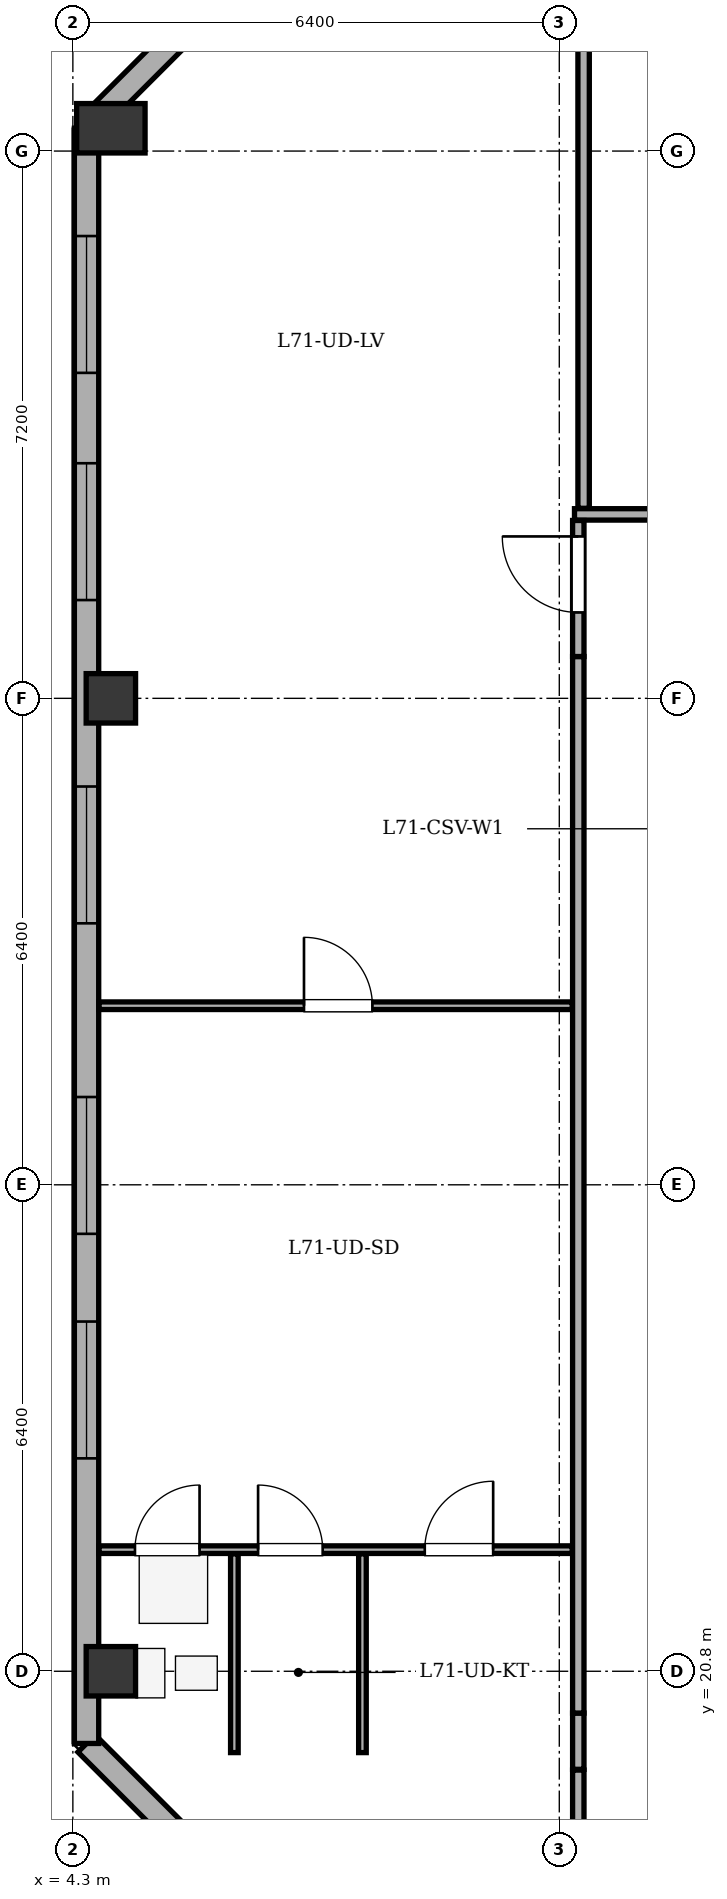
"""IFC4 building model, lengths in metres.
Left out: names, types, materials, properties, quantities, classifications, styles, units other than length and angle.
Written with IfcOpenShell. Run it as: python <this file> out.ifc"""

import sys

from ifc_helpers import new_model, si_unit, direction, frame, frame_2d, origin, origin_2d, place, context, subcontext, project, spatial, rectangle, extrude, element, fill, save


model = new_model("IFC4")
c1 = context("Model", 3, precision=1e-05, world=origin(), true_north=direction((0.0, 1.0)))
c2 = subcontext(c1, "Body", "Model", "MODEL_VIEW")
j1 = project(units=[si_unit("LENGTHUNIT", "METRE"), si_unit("PLANEANGLEUNIT", "RADIAN")], contexts=[c1])
p1 = place(None, origin())
s1 = spatial("IfcSite", under=j1, at=p1, CompositionType="ELEMENT")
p2 = place(p1, origin())
s2 = spatial("IfcBuilding", under=s1, at=p2, CompositionType="ELEMENT")
p3 = place(p2, frame((0.0, 0.0, 268.7)))
s3 = spatial("IfcBuildingStorey", under=s2, at=p3, CompositionType="ELEMENT", Elevation=268.7)
for number, where, z_axis, x_axis in (
    (1, (4.8, 20.8, 0.0), (0.0, 0.0, 1.0), (1.0, 0.0, 0.0)),
    (2, (4.8, 33.6, 0.0), (0.0, 0.0, 1.0), (1.0, 0.0, 0.0)),
):
    element("IfcColumn", number, at=place(p3, frame(where, z_axis=z_axis, x_axis=x_axis)), inside=s3, PredefinedType="COLUMN", context=c2, shape_type="SweptSolid", body=[
        extrude(rectangle(XDim=0.65, YDim=0.65, at=origin_2d()), origin(), (0.0, 0.0, 1.0), 3.4),
    ])
p4 = place(p3, frame((4.8, 41.1, 0.0), z_axis=(0.0, 0.0, 1.0), x_axis=(1.0, 0.0, 0.0)))
e3 = element("IfcColumn", 3, at=p4, inside=s3, PredefinedType="COLUMN", context=c2, shape_type="SweptSolid", body=[
    extrude(rectangle(XDim=0.65, YDim=0.9, at=origin_2d()), origin(), (0.0, 0.0, 1.0), 3.4),
])
p5 = place(p3, frame((8.3, 16.03, 0.0), z_axis=(0.0, 0.0, 1.0), x_axis=(-0.707106781187, 0.707106781187, 0.0)))
e4 = element("IfcWall", 4, at=p5, inside=s3, PredefinedType="STANDARD", context=c2, shape_type="SweptSolid", body=[
    extrude(rectangle(XDim=5.402, YDim=0.32, at=frame_2d((2.701, 0.0))), origin(), (0.0, 0.0, 1.0), 2.725),
])
p6 = place(p5, frame((2.001, 0.0, 0.75)))
e5 = element("IfcOpeningElement", 5, at=p6, cuts=e4, PredefinedType="OPENING", context=c2, shape_type="SweptSolid", body=[
    extrude(rectangle(XDim=1.4, YDim=1.65, at=frame_2d((0.7, 0.825))), frame((0.0, 0.17, 0.0), z_axis=(0.0, -1.0, 0.0), x_axis=(1.0, 0.0, 0.0)), (0.0, 0.0, 1.0), 0.34),
])
p7 = place(p3, frame((4.48, 19.85, 0.0), z_axis=(0.0, 0.0, 1.0), x_axis=(0.0, 1.0, 0.0)))
e6 = element("IfcWall", 6, at=p7, inside=s3, PredefinedType="STANDARD", context=c2, shape_type="SweptSolid", body=[
    extrude(rectangle(XDim=21.25, YDim=0.32, at=frame_2d((10.625, 0.0))), origin(), (0.0, 0.0, 1.0), 2.725),
])
p8 = place(p7, frame((3.751, 0.0, 0.75)))
e7 = element("IfcOpeningElement", 7, at=p8, cuts=e6, PredefinedType="OPENING", context=c2, shape_type="SweptSolid", body=[
    extrude(rectangle(XDim=1.8, YDim=1.7, at=frame_2d((0.9, 0.85))), frame((0.0, 0.17, 0.0), z_axis=(0.0, -1.0, 0.0), x_axis=(1.0, 0.0, 0.0)), (0.0, 0.0, 1.0), 0.34),
])
p9 = place(p7, frame((6.705, 0.0, 0.75)))
e8 = element("IfcOpeningElement", 8, at=p9, cuts=e6, PredefinedType="OPENING", context=c2, shape_type="SweptSolid", body=[
    extrude(rectangle(XDim=1.8, YDim=1.7, at=frame_2d((0.9, 0.85))), frame((0.0, 0.17, 0.0), z_axis=(0.0, -1.0, 0.0), x_axis=(1.0, 0.0, 0.0)), (0.0, 0.0, 1.0), 0.34),
])
p10 = place(p7, frame((10.79, 0.0, 0.75)))
e9 = element("IfcOpeningElement", 9, at=p10, cuts=e6, PredefinedType="OPENING", context=c2, shape_type="SweptSolid", body=[
    extrude(rectangle(XDim=1.8, YDim=1.7, at=frame_2d((0.9, 0.85))), frame((0.0, 0.17, 0.0), z_axis=(0.0, -1.0, 0.0), x_axis=(1.0, 0.0, 0.0)), (0.0, 0.0, 1.0), 0.34),
])
p11 = place(p7, frame((15.043, 0.0, 0.75)))
e10 = element("IfcOpeningElement", 10, at=p11, cuts=e6, PredefinedType="OPENING", context=c2, shape_type="SweptSolid", body=[
    extrude(rectangle(XDim=1.8, YDim=1.7, at=frame_2d((0.9, 0.85))), frame((0.0, 0.17, 0.0), z_axis=(0.0, -1.0, 0.0), x_axis=(1.0, 0.0, 0.0)), (0.0, 0.0, 1.0), 0.34),
])
p12 = place(p7, frame((18.032, 0.0, 0.75)))
e11 = element("IfcOpeningElement", 11, at=p12, cuts=e6, PredefinedType="OPENING", context=c2, shape_type="SweptSolid", body=[
    extrude(rectangle(XDim=1.8, YDim=1.7, at=frame_2d((0.9, 0.85))), frame((0.0, 0.17, 0.0), z_axis=(0.0, -1.0, 0.0), x_axis=(1.0, 0.0, 0.0)), (0.0, 0.0, 1.0), 0.34),
])
p13 = place(p3, frame((4.48, 41.1, 0.0), z_axis=(0.0, 0.0, 1.0), x_axis=(0.70712937715, 0.707084184501, 0.0)))
e12 = element("IfcWall", 12, at=p13, inside=s3, PredefinedType="STANDARD", context=c2, shape_type="SweptSolid", body=[
    extrude(rectangle(XDim=5.402, YDim=0.32, at=frame_2d((2.701, 0.0))), origin(), (0.0, 0.0, 1.0), 2.725),
])
p14 = place(p13, frame((2.001, 0.0, 0.75)))
e13 = element("IfcOpeningElement", 13, at=p14, cuts=e12, PredefinedType="OPENING", context=c2, shape_type="SweptSolid", body=[
    extrude(rectangle(XDim=1.4, YDim=1.65, at=frame_2d((0.7, 0.825))), frame((0.0, 0.17, 0.0), z_axis=(0.0, -1.0, 0.0), x_axis=(1.0, 0.0, 0.0)), (0.0, 0.0, 1.0), 0.34),
])
p15 = place(p3, frame((10.9, 36.02, 0.0), z_axis=(0.0, 0.0, 1.0), x_axis=(1.0, 0.0, 0.0)))
e14 = element("IfcWall", 14, at=p15, inside=s3, PredefinedType="PARTITIONING", context=c2, shape_type="SweptSolid", body=[
    extrude(rectangle(XDim=34.52, YDim=0.15, at=frame_2d((17.26, 0.0))), origin(), (0.0, 0.0, 1.0), 3.1),
])
p16 = place(p15, frame((5.276, 0.0, 0.0)))
e15 = element("IfcOpeningElement", 15, at=p16, cuts=e14, PredefinedType="OPENING", context=c2, shape_type="SweptSolid", body=[
    extrude(rectangle(XDim=1.0, YDim=2.1, at=frame_2d((0.5, 1.05))), frame((0.0, 0.085, 0.0), z_axis=(0.0, -1.0, 0.0), x_axis=(1.0, 0.0, 0.0)), (0.0, 0.0, 1.0), 0.17),
])
p17 = place(p15, frame((16.931, 0.0, 0.0)))
e16 = element("IfcOpeningElement", 16, at=p17, cuts=e14, PredefinedType="OPENING", context=c2, shape_type="SweptSolid", body=[
    extrude(rectangle(XDim=1.0, YDim=2.1, at=frame_2d((0.5, 1.05))), frame((0.0, 0.085, 0.0), z_axis=(0.0, -1.0, 0.0), x_axis=(1.0, 0.0, 0.0)), (0.0, 0.0, 1.0), 0.17),
])
p18 = place(p15, frame((28.415, 0.0, 0.0)))
e17 = element("IfcOpeningElement", 17, at=p18, cuts=e14, PredefinedType="OPENING", context=c2, shape_type="SweptSolid", body=[
    extrude(rectangle(XDim=1.0, YDim=2.1, at=frame_2d((0.5, 1.05))), frame((0.0, 0.085, 0.0), z_axis=(0.0, -1.0, 0.0), x_axis=(1.0, 0.0, 0.0)), (0.0, 0.0, 1.0), 0.17),
])
p19 = place(p3, frame((11.02, 36.1, 0.0), z_axis=(0.0, 0.0, 1.0), x_axis=(0.0, 1.0, 0.0)))
e18 = element("IfcWall", 18, at=p19, inside=s3, PredefinedType="PARTITIONING", context=c2, shape_type="SweptSolid", body=[
    extrude(rectangle(XDim=8.655, YDim=0.15, at=frame_2d((4.327, 0.0))), origin(), (0.0, 0.0, 1.0), 3.1),
])
p20 = place(p3, frame((10.95, 19.5, 0.0), z_axis=(0.0, 0.0, 1.0), x_axis=(0.0, -1.0, 0.0)))
e19 = element("IfcWall", 19, at=p20, inside=s3, PredefinedType="PARTITIONING", context=c2, shape_type="SweptSolid", body=[
    extrude(rectangle(XDim=0.96, YDim=0.15, at=frame_2d((0.48, 0.0))), origin(), (0.0, 0.0, 1.0), 3.1),
])
p21 = place(p3, frame((10.95, 19.51, 0.0), z_axis=(0.0, 0.0, 1.0), x_axis=(0.0, 1.0, 0.0)))
e20 = element("IfcWall", 20, at=p21, inside=s3, PredefinedType="PARTITIONING", context=c2, shape_type="SweptSolid", body=[
    extrude(rectangle(XDim=0.74, YDim=0.15, at=frame_2d((0.37, 0.0))), origin(), (0.0, 0.0, 1.0), 3.1),
])
p22 = place(p3, frame((10.95, 20.25, 0.0), z_axis=(0.0, 0.0, 1.0), x_axis=(0.0, 1.0, 0.0)))
e21 = element("IfcWall", 21, at=p22, inside=s3, PredefinedType="PARTITIONING", context=c2, shape_type="SweptSolid", body=[
    extrude(rectangle(XDim=13.9, YDim=0.15, at=frame_2d((6.95, 0.0))), origin(), (0.0, 0.0, 1.0), 3.1),
])
p23 = place(p3, frame((10.95, 34.15, 0.0), z_axis=(0.0, 0.0, 1.0), x_axis=(0.0, 1.0, 0.0)))
e22 = element("IfcWall", 22, at=p23, inside=s3, PredefinedType="PARTITIONING", context=c2, shape_type="SweptSolid", body=[
    extrude(rectangle(XDim=1.79, YDim=0.15, at=frame_2d((0.895, 0.0))), origin(), (0.0, 0.0, 1.0), 3.1),
])
p24 = place(p23, frame((0.58, 0.0, 0.0)))
e23 = element("IfcOpeningElement", 23, at=p24, cuts=e22, PredefinedType="OPENING", context=c2, shape_type="SweptSolid", body=[
    extrude(rectangle(XDim=1.0, YDim=2.1, at=frame_2d((0.5, 1.05))), frame((0.0, 0.085, 0.0), z_axis=(0.0, -1.0, 0.0), x_axis=(1.0, 0.0, 0.0)), (0.0, 0.0, 1.0), 0.17),
])
p25 = place(p3, frame((4.645, 22.4, 0.0), z_axis=(0.0, 0.0, 1.0), x_axis=(1.0, 0.0, 0.0)))
e24 = element("IfcWall", 24, at=p25, inside=s3, PredefinedType="PARTITIONING", context=c2, shape_type="SweptSolid", body=[
    extrude(rectangle(XDim=6.225, YDim=0.1, at=frame_2d((3.113, 0.0))), origin(), (0.0, 0.0, 1.0), 3.1),
])
p26 = place(p25, frame((0.472, 0.0, 0.0)))
e25 = element("IfcOpeningElement", 25, at=p26, cuts=e24, PredefinedType="OPENING", context=c2, shape_type="SweptSolid", body=[
    extrude(rectangle(XDim=0.85, YDim=2.05, at=frame_2d((0.425, 1.025))), frame((0.0, 0.06, 0.0), z_axis=(0.0, -1.0, 0.0), x_axis=(1.0, 0.0, 0.0)), (0.0, 0.0, 1.0), 0.12),
])
p27 = place(p25, frame((2.092, 0.0, 0.0)))
e26 = element("IfcOpeningElement", 26, at=p27, cuts=e24, PredefinedType="OPENING", context=c2, shape_type="SweptSolid", body=[
    extrude(rectangle(XDim=0.85, YDim=2.05, at=frame_2d((0.425, 1.025))), frame((0.0, 0.06, 0.0), z_axis=(0.0, -1.0, 0.0), x_axis=(1.0, 0.0, 0.0)), (0.0, 0.0, 1.0), 0.12),
])
p28 = place(p25, frame((4.285, 0.0, 0.0)))
e27 = element("IfcOpeningElement", 27, at=p28, cuts=e24, PredefinedType="OPENING", context=c2, shape_type="SweptSolid", body=[
    extrude(rectangle(XDim=0.9, YDim=2.05, at=frame_2d((0.45, 1.025))), frame((0.0, 0.06, 0.0), z_axis=(0.0, -1.0, 0.0), x_axis=(1.0, 0.0, 0.0)), (0.0, 0.0, 1.0), 0.12),
])
p29 = place(p3, frame((4.645, 29.556, 0.0), z_axis=(0.0, 0.0, 1.0), x_axis=(1.0, 0.0, 0.0)))
e28 = element("IfcWall", 28, at=p29, inside=s3, PredefinedType="PARTITIONING", context=c2, shape_type="SweptSolid", body=[
    extrude(rectangle(XDim=6.225, YDim=0.1, at=frame_2d((3.113, 0.0))), origin(), (0.0, 0.0, 1.0), 2.725),
])
p30 = place(p29, frame((2.696, 0.0, 0.0)))
e29 = element("IfcOpeningElement", 29, at=p30, cuts=e28, PredefinedType="OPENING", context=c2, shape_type="SweptSolid", body=[
    extrude(rectangle(XDim=0.9, YDim=2.05, at=frame_2d((0.45, 1.025))), frame((0.0, 0.06, 0.0), z_axis=(0.0, -1.0, 0.0), x_axis=(1.0, 0.0, 0.0)), (0.0, 0.0, 1.0), 0.12),
])
for number, where, z_axis, x_axis in (
    (30, (6.425, 19.73, 0.0), (0.0, 0.0, 1.0), (0.0, 1.0, 0.0)),
    (31, (8.11, 19.73, 0.0), (0.0, 0.0, 1.0), (0.0, 1.0, 0.0)),
):
    element("IfcWall", number, at=place(p3, frame(where, z_axis=z_axis, x_axis=x_axis)), inside=s3, PredefinedType="PARTITIONING", context=c2, shape_type="SweptSolid", body=[
        extrude(rectangle(XDim=2.615, YDim=0.1, at=frame_2d((1.308, 0.0))), origin(), (0.0, 0.0, 1.0), 3.1),
    ])
p31 = place(p8, origin())
e32 = element("IfcWindow", 32, at=p31, inside=s3, PartitioningType="SINGLE_PANEL", PredefinedType="WINDOW", context=c2, shape_type="SweptSolid", body=[
    extrude(rectangle(XDim=1.8, YDim=1.7, at=frame_2d((0.9, 0.85))), frame((0.0, -0.01, 0.0), z_axis=(0.0, -1.0, 0.0), x_axis=(1.0, 0.0, 0.0)), (0.0, 0.0, 1.0), 0.06),
])
fill(e7, e32)
p32 = place(p9, origin())
e33 = element("IfcWindow", 33, at=p32, inside=s3, PartitioningType="SINGLE_PANEL", PredefinedType="WINDOW", context=c2, shape_type="SweptSolid", body=[
    extrude(rectangle(XDim=1.8, YDim=1.7, at=frame_2d((0.9, 0.85))), frame((0.0, -0.01, 0.0), z_axis=(0.0, -1.0, 0.0), x_axis=(1.0, 0.0, 0.0)), (0.0, 0.0, 1.0), 0.06),
])
fill(e8, e33)
p33 = place(p10, origin())
e34 = element("IfcWindow", 34, at=p33, inside=s3, PartitioningType="SINGLE_PANEL", PredefinedType="WINDOW", context=c2, shape_type="SweptSolid", body=[
    extrude(rectangle(XDim=1.8, YDim=1.7, at=frame_2d((0.9, 0.85))), frame((0.0, -0.01, 0.0), z_axis=(0.0, -1.0, 0.0), x_axis=(1.0, 0.0, 0.0)), (0.0, 0.0, 1.0), 0.06),
])
fill(e9, e34)
p34 = place(p11, origin())
e35 = element("IfcWindow", 35, at=p34, inside=s3, PartitioningType="SINGLE_PANEL", PredefinedType="WINDOW", context=c2, shape_type="SweptSolid", body=[
    extrude(rectangle(XDim=1.8, YDim=1.7, at=frame_2d((0.9, 0.85))), frame((0.0, -0.01, 0.0), z_axis=(0.0, -1.0, 0.0), x_axis=(1.0, 0.0, 0.0)), (0.0, 0.0, 1.0), 0.06),
])
fill(e10, e35)
p35 = place(p12, origin())
e36 = element("IfcWindow", 36, at=p35, inside=s3, PartitioningType="SINGLE_PANEL", PredefinedType="WINDOW", context=c2, shape_type="SweptSolid", body=[
    extrude(rectangle(XDim=1.8, YDim=1.7, at=frame_2d((0.9, 0.85))), frame((0.0, -0.01, 0.0), z_axis=(0.0, -1.0, 0.0), x_axis=(1.0, 0.0, 0.0)), (0.0, 0.0, 1.0), 0.06),
])
fill(e11, e36)
p36 = place(p24, origin())
e37 = element("IfcDoor", 37, at=p36, inside=s3, OperationType="SINGLE_SWING_RIGHT", PredefinedType="DOOR", context=c2, shape_type="SweptSolid", body=[
    extrude(rectangle(XDim=1.0, YDim=2.1, at=frame_2d((0.5, 1.05))), frame((0.0, 0.025, 0.0), z_axis=(0.0, -1.0, 0.0), x_axis=(1.0, 0.0, 0.0)), (0.0, 0.0, 1.0), 0.05),
])
fill(e23, e37)
p37 = place(p30, origin())
e38 = element("IfcDoor", 38, at=p37, inside=s3, OperationType="SINGLE_SWING_LEFT", PredefinedType="DOOR", context=c2, shape_type="SweptSolid", body=[
    extrude(rectangle(XDim=0.9, YDim=2.05, at=frame_2d((0.45, 1.025))), frame((0.0, 0.025, 0.0), z_axis=(0.0, -1.0, 0.0), x_axis=(1.0, 0.0, 0.0)), (0.0, 0.0, 1.0), 0.05),
])
fill(e29, e38)
p38 = place(p26, origin())
e39 = element("IfcDoor", 39, at=p38, inside=s3, OperationType="SINGLE_SWING_RIGHT", PredefinedType="DOOR", context=c2, shape_type="SweptSolid", body=[
    extrude(rectangle(XDim=0.85, YDim=2.05, at=frame_2d((0.425, 1.025))), frame((0.0, 0.025, 0.0), z_axis=(0.0, -1.0, 0.0), x_axis=(1.0, 0.0, 0.0)), (0.0, 0.0, 1.0), 0.05),
])
fill(e25, e39)
p39 = place(p27, origin())
e40 = element("IfcDoor", 40, at=p39, inside=s3, OperationType="SINGLE_SWING_LEFT", PredefinedType="DOOR", context=c2, shape_type="SweptSolid", body=[
    extrude(rectangle(XDim=0.85, YDim=2.05, at=frame_2d((0.425, 1.025))), frame((0.0, 0.025, 0.0), z_axis=(0.0, -1.0, 0.0), x_axis=(1.0, 0.0, 0.0)), (0.0, 0.0, 1.0), 0.05),
])
fill(e26, e40)
p40 = place(p28, origin())
e41 = element("IfcDoor", 41, at=p40, inside=s3, OperationType="SINGLE_SWING_RIGHT", PredefinedType="DOOR", context=c2, shape_type="SweptSolid", body=[
    extrude(rectangle(XDim=0.9, YDim=2.05, at=frame_2d((0.45, 1.025))), frame((0.0, 0.025, 0.0), z_axis=(0.0, -1.0, 0.0), x_axis=(1.0, 0.0, 0.0)), (0.0, 0.0, 1.0), 0.05),
])
fill(e27, e41)
save(model, sys.argv[1])
